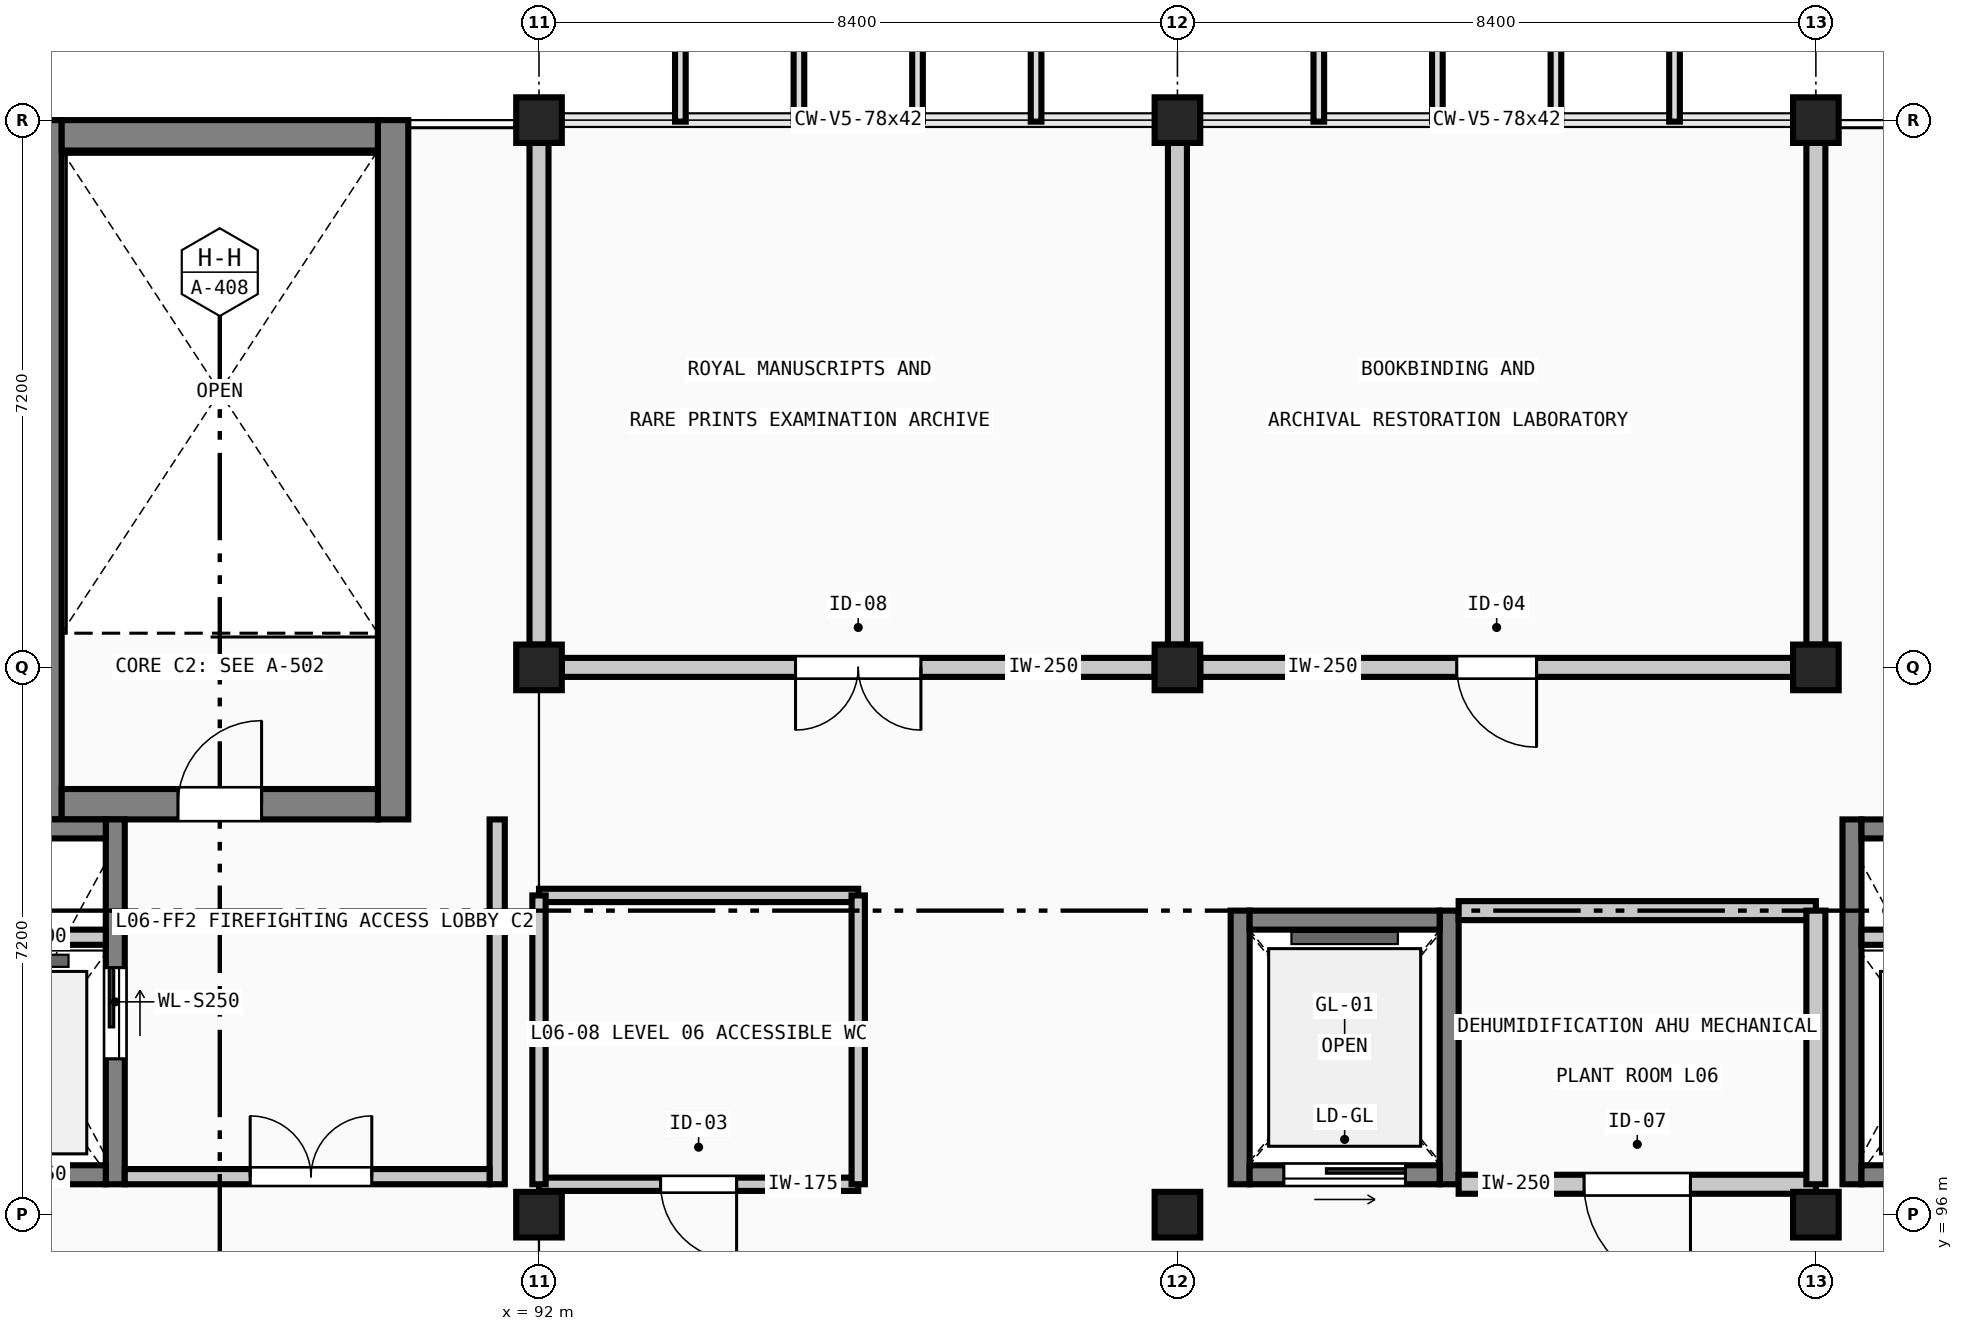
"""IFC4 building model, lengths in metres.
Left out: names, types, materials, properties, quantities, classifications, styles, units other than length and angle.
Written with IfcOpenShell. Run it as: python <this file> out.ifc"""

import sys

from ifc_helpers import new_model, si_unit, direction, frame, frame_2d, origin, origin_2d, place, context, subcontext, project, spatial, rectangle, extrude, element, fill, save


model = new_model("IFC4")
c1 = context("Model", 3, precision=1e-05, world=origin(), true_north=direction((0.0, 1.0)))
c2 = subcontext(c1, "Body", "Model", "MODEL_VIEW")
j1 = project(units=[si_unit("LENGTHUNIT", "METRE"), si_unit("PLANEANGLEUNIT", "RADIAN")], contexts=[c1])
p1 = place(None, origin())
s1 = spatial("IfcSite", under=j1, at=p1, CompositionType="ELEMENT")
p2 = place(p1, origin())
s2 = spatial("IfcBuilding", under=s1, at=p2, CompositionType="ELEMENT")
p3 = place(p2, frame((0.0, 0.0, 27.84)))
s3 = spatial("IfcBuildingStorey", under=s2, at=p3, CompositionType="ELEMENT", Elevation=27.84)
for number, where, z_axis, x_axis in (
    (1, (92.0, 96.0, 0.0), (0.0, 0.0, 1.0), (1.0, 0.0, 0.0)),
    (2, (92.0, 103.2, 0.0), (0.0, 0.0, 1.0), (1.0, 0.0, 0.0)),
    (3, (92.0, 110.4, 0.0), (0.0, 0.0, 1.0), (1.0, 0.0, 0.0)),
    (4, (100.4, 96.0, 0.0), (0.0, 0.0, 1.0), (1.0, 0.0, 0.0)),
    (5, (100.4, 103.2, 0.0), (0.0, 0.0, 1.0), (1.0, 0.0, 0.0)),
    (6, (100.4, 110.4, 0.0), (0.0, 0.0, 1.0), (1.0, 0.0, 0.0)),
    (7, (108.8, 96.0, 0.0), (0.0, 0.0, 1.0), (1.0, 0.0, 0.0)),
    (8, (108.8, 103.2, 0.0), (0.0, 0.0, 1.0), (1.0, 0.0, 0.0)),
    (9, (108.8, 110.4, 0.0), (0.0, 0.0, 1.0), (1.0, 0.0, 0.0)),
):
    element("IfcColumn", number, at=place(p3, frame(where, z_axis=z_axis, x_axis=x_axis)), inside=s3, PredefinedType="COLUMN", context=c2, shape_type="SweptSolid", body=[
        extrude(rectangle(XDim=0.6, YDim=0.6, at=origin_2d()), origin(), (0.0, 0.0, 1.0), 4.48),
    ])
for number, where, z_axis, x_axis in (
    (10, (85.52, 101.2, 0.0), (0.0, 0.0, 1.0), (0.0, 1.0, 0.0)),
    (11, (90.08, 110.4, 0.0), (0.0, 0.0, 1.0), (0.0, -1.0, 0.0)),
):
    element("IfcWall", number, at=place(p3, frame(where, z_axis=z_axis, x_axis=x_axis)), inside=s3, PredefinedType="SHEAR", context=c2, shape_type="SweptSolid", body=[
        extrude(rectangle(XDim=9.2, YDim=0.4, at=frame_2d((4.6, 0.0))), origin(), (0.0, 0.0, 1.0), 4.28),
    ])
p4 = place(p3, frame((89.88, 101.4, 0.0), z_axis=(0.0, 0.0, 1.0), x_axis=(-1.0, 0.0, 0.0)))
e12 = element("IfcWall", 12, at=p4, inside=s3, PredefinedType="SHEAR", context=c2, shape_type="SweptSolid", body=[
    extrude(rectangle(XDim=4.16, YDim=0.4, at=frame_2d((2.08, 0.0))), origin(), (0.0, 0.0, 1.0), 4.28),
])
p5 = place(p4, frame((1.53, 0.0, 0.0)))
e13 = element("IfcOpeningElement", 13, at=p5, cuts=e12, PredefinedType="OPENING", context=c2, shape_type="SweptSolid", body=[
    extrude(rectangle(XDim=1.1, YDim=2.2, at=frame_2d((0.55, 1.1))), frame((0.0, 0.21, 0.0), z_axis=(0.0, -1.0, 0.0), x_axis=(1.0, 0.0, 0.0)), (0.0, 0.0, 1.0), 0.42),
])
p6 = place(p3, frame((85.72, 110.2, 0.0), z_axis=(0.0, 0.0, 1.0), x_axis=(1.0, 0.0, 0.0)))
e14 = element("IfcWall", 14, at=p6, inside=s3, PredefinedType="SHEAR", context=c2, shape_type="SweptSolid", body=[
    extrude(rectangle(XDim=4.16, YDim=0.4, at=frame_2d((2.08, 0.0))), origin(), (0.0, 0.0, 1.0), 4.28),
])
p7 = place(p3, frame((86.425, 101.2, 0.0), z_axis=(0.0, 0.0, 1.0), x_axis=(0.0, -1.0, 0.0)))
e15 = element("IfcWall", 15, at=p7, inside=s3, PredefinedType="SOLIDWALL", context=c2, shape_type="SweptSolid", body=[
    extrude(rectangle(XDim=4.8, YDim=0.25, at=frame_2d((2.4, 0.0))), origin(), (0.0, 0.0, 1.0), 4.28),
])
p8 = place(p7, frame((1.95, 0.0, 0.0)))
e16 = element("IfcOpeningElement", 16, at=p8, cuts=e15, PredefinedType="OPENING", context=c2, shape_type="SweptSolid", body=[
    extrude(rectangle(XDim=1.2, YDim=2.2, at=frame_2d((0.6, 1.1))), frame((0.0, 0.135, 0.0), z_axis=(0.0, -1.0, 0.0), x_axis=(1.0, 0.0, 0.0)), (0.0, 0.0, 1.0), 0.27),
])
for number, where, z_axis, x_axis in (
    (17, (86.3, 96.525, 0.0), (0.0, 0.0, 1.0), (-1.0, 0.0, 0.0)),
    (18, (84.2, 101.075, 0.0), (0.0, 0.0, 1.0), (1.0, 0.0, 0.0)),
):
    element("IfcWall", number, at=place(p3, frame(where, z_axis=z_axis, x_axis=x_axis)), inside=s3, PredefinedType="SOLIDWALL", context=c2, shape_type="SweptSolid", body=[
        extrude(rectangle(XDim=2.1, YDim=0.25, at=frame_2d((1.05, 0.0))), origin(), (0.0, 0.0, 1.0), 4.28),
    ])
p9 = place(p3, frame((84.2, 99.65, 0.0), z_axis=(0.0, 0.0, 1.0), x_axis=(1.0, 0.0, 0.0)))
e19 = element("IfcWall", 19, at=p9, inside=s3, PredefinedType="SOLIDWALL", context=c2, shape_type="SweptSolid", body=[
    extrude(rectangle(XDim=2.1, YDim=0.2, at=frame_2d((1.05, 0.0))), origin(), (0.0, 0.0, 1.0), 4.28),
])
p10 = place(p3, frame((91.45, 101.2, 0.0), z_axis=(0.0, 0.0, 1.0), x_axis=(0.0, -1.0, 0.0)))
e20 = element("IfcWall", 20, at=p10, inside=s3, PredefinedType="SOLIDWALL", context=c2, shape_type="SweptSolid", body=[
    extrude(rectangle(XDim=4.8, YDim=0.2, at=frame_2d((2.4, 0.0))), origin(), (0.0, 0.0, 1.0), 4.28),
])
p11 = place(p3, frame((91.35, 96.5, 0.0), z_axis=(0.0, 0.0, 1.0), x_axis=(-1.0, 0.0, 0.0)))
e21 = element("IfcWall", 21, at=p11, inside=s3, PredefinedType="SOLIDWALL", context=c2, shape_type="SweptSolid", body=[
    extrude(rectangle(XDim=4.8, YDim=0.2, at=frame_2d((2.4, 0.0))), origin(), (0.0, 0.0, 1.0), 4.28),
])
p12 = place(p11, frame((1.55, 0.0, 0.0)))
e22 = element("IfcOpeningElement", 22, at=p12, cuts=e21, PredefinedType="OPENING", context=c2, shape_type="SweptSolid", body=[
    extrude(rectangle(XDim=1.6, YDim=2.2, at=frame_2d((0.8, 1.1))), frame((0.0, 0.11, 0.0), z_axis=(0.0, -1.0, 0.0), x_axis=(1.0, 0.0, 0.0)), (0.0, 0.0, 1.0), 0.22),
])
p13 = place(p3, frame((109.275, 96.4, 0.0), z_axis=(0.0, 0.0, 1.0), x_axis=(0.0, 1.0, 0.0)))
e23 = element("IfcWall", 23, at=p13, inside=s3, PredefinedType="SOLIDWALL", context=c2, shape_type="SweptSolid", body=[
    extrude(rectangle(XDim=4.8, YDim=0.25, at=frame_2d((2.4, 0.0))), origin(), (0.0, 0.0, 1.0), 4.28),
])
for number, where, z_axis, x_axis in (
    (24, (111.5, 96.525, 0.0), (0.0, 0.0, 1.0), (-1.0, 0.0, 0.0)),
    (25, (109.4, 101.075, 0.0), (0.0, 0.0, 1.0), (1.0, 0.0, 0.0)),
):
    element("IfcWall", number, at=place(p3, frame(where, z_axis=z_axis, x_axis=x_axis)), inside=s3, PredefinedType="SOLIDWALL", context=c2, shape_type="SweptSolid", body=[
        extrude(rectangle(XDim=2.1, YDim=0.25, at=frame_2d((1.05, 0.0))), origin(), (0.0, 0.0, 1.0), 4.28),
    ])
p14 = place(p3, frame((109.4, 99.65, 0.0), z_axis=(0.0, 0.0, 1.0), x_axis=(1.0, 0.0, 0.0)))
e26 = element("IfcWall", 26, at=p14, inside=s3, PredefinedType="SOLIDWALL", context=c2, shape_type="SweptSolid", body=[
    extrude(rectangle(XDim=2.1, YDim=0.2, at=frame_2d((1.05, 0.0))), origin(), (0.0, 0.0, 1.0), 4.28),
])
for number, where, z_axis, x_axis in (
    (27, (101.225, 96.4, 0.0), (0.0, 0.0, 1.0), (0.0, 1.0, 0.0)),
    (28, (103.975, 100.0, 0.0), (0.0, 0.0, 1.0), (0.0, -1.0, 0.0)),
):
    element("IfcWall", number, at=place(p3, frame(where, z_axis=z_axis, x_axis=x_axis)), inside=s3, PredefinedType="SOLIDWALL", context=c2, shape_type="SweptSolid", body=[
        extrude(rectangle(XDim=3.6, YDim=0.25, at=frame_2d((1.8, 0.0))), origin(), (0.0, 0.0, 1.0), 4.28),
    ])
p15 = place(p3, frame((103.85, 96.525, 0.0), z_axis=(0.0, 0.0, 1.0), x_axis=(-1.0, 0.0, 0.0)))
e29 = element("IfcWall", 29, at=p15, inside=s3, PredefinedType="SOLIDWALL", context=c2, shape_type="SweptSolid", body=[
    extrude(rectangle(XDim=2.5, YDim=0.25, at=frame_2d((1.25, 0.0))), origin(), (0.0, 0.0, 1.0), 4.28),
])
p16 = place(p15, frame((0.45, 0.0, 0.0)))
e30 = element("IfcOpeningElement", 30, at=p16, cuts=e29, PredefinedType="OPENING", context=c2, shape_type="SweptSolid", body=[
    extrude(rectangle(XDim=1.6, YDim=2.3, at=frame_2d((0.8, 1.15))), frame((0.0, 0.135, 0.0), z_axis=(0.0, -1.0, 0.0), x_axis=(1.0, 0.0, 0.0)), (0.0, 0.0, 1.0), 0.27),
])
p17 = place(p3, frame((101.35, 99.875, 0.0), z_axis=(0.0, 0.0, 1.0), x_axis=(1.0, 0.0, 0.0)))
e31 = element("IfcWall", 31, at=p17, inside=s3, PredefinedType="SOLIDWALL", context=c2, shape_type="SweptSolid", body=[
    extrude(rectangle(XDim=2.5, YDim=0.25, at=frame_2d((1.25, 0.0))), origin(), (0.0, 0.0, 1.0), 4.28),
])
p18 = place(p3, frame((100.1, 103.2, 0.0), z_axis=(0.0, 0.0, 1.0), x_axis=(-1.0, 0.0, 0.0)))
e32 = element("IfcWall", 32, at=p18, inside=s3, PredefinedType="SOLIDWALL", context=c2, shape_type="SweptSolid", body=[
    extrude(rectangle(XDim=7.8, YDim=0.25, at=frame_2d((3.9, 0.0))), origin(), (0.0, 0.0, 1.0), 3.53),
])
p19 = place(p18, frame((3.075, 0.0, 0.0)))
e33 = element("IfcOpeningElement", 33, at=p19, cuts=e32, PredefinedType="OPENING", context=c2, shape_type="SweptSolid", body=[
    extrude(rectangle(XDim=1.65, YDim=2.25, at=frame_2d((0.825, 1.125))), frame((0.0, 0.135, 0.0), z_axis=(0.0, -1.0, 0.0), x_axis=(1.0, 0.0, 0.0)), (0.0, 0.0, 1.0), 0.27),
])
p20 = place(p3, frame((108.5, 103.2, 0.0), z_axis=(0.0, 0.0, 1.0), x_axis=(-1.0, 0.0, 0.0)))
e34 = element("IfcWall", 34, at=p20, inside=s3, PredefinedType="SOLIDWALL", context=c2, shape_type="SweptSolid", body=[
    extrude(rectangle(XDim=7.8, YDim=0.25, at=frame_2d((3.9, 0.0))), origin(), (0.0, 0.0, 1.0), 3.53),
])
p21 = place(p20, frame((3.375, 0.0, 0.0)))
e35 = element("IfcOpeningElement", 35, at=p21, cuts=e34, PredefinedType="OPENING", context=c2, shape_type="SweptSolid", body=[
    extrude(rectangle(XDim=1.05, YDim=2.2, at=frame_2d((0.525, 1.1))), frame((0.0, 0.135, 0.0), z_axis=(0.0, -1.0, 0.0), x_axis=(1.0, 0.0, 0.0)), (0.0, 0.0, 1.0), 0.27),
])
p22 = place(p3, frame((108.8, 96.4, 0.0), z_axis=(0.0, 0.0, 1.0), x_axis=(-1.0, 0.0, 0.0)))
e36 = element("IfcWall", 36, at=p22, inside=s3, PredefinedType="SOLIDWALL", context=c2, shape_type="SweptSolid", body=[
    extrude(rectangle(XDim=4.7, YDim=0.25, at=frame_2d((2.35, 0.0))), origin(), (0.0, 0.0, 1.0), 4.28),
])
p23 = place(p22, frame((1.65, 0.0, 0.0)))
e37 = element("IfcOpeningElement", 37, at=p23, cuts=e36, PredefinedType="OPENING", context=c2, shape_type="SweptSolid", body=[
    extrude(rectangle(XDim=1.4, YDim=2.2, at=frame_2d((0.7, 1.1))), frame((0.0, 0.135, 0.0), z_axis=(0.0, -1.0, 0.0), x_axis=(1.0, 0.0, 0.0)), (0.0, 0.0, 1.0), 0.27),
])
p24 = place(p3, frame((96.2, 96.4, 0.0), z_axis=(0.0, 0.0, 1.0), x_axis=(-1.0, 0.0, 0.0)))
e38 = element("IfcWall", 38, at=p24, inside=s3, PredefinedType="PLUMBINGWALL", context=c2, shape_type="SweptSolid", body=[
    extrude(rectangle(XDim=4.2, YDim=0.175, at=frame_2d((2.1, 0.0))), origin(), (0.0, 0.0, 1.0), 4.28),
])
p25 = place(p24, frame((1.6, 0.0, 0.0)))
e39 = element("IfcOpeningElement", 39, at=p25, cuts=e38, PredefinedType="OPENING", context=c2, shape_type="SweptSolid", body=[
    extrude(rectangle(XDim=1.0, YDim=2.15, at=frame_2d((0.5, 1.075))), frame((0.0, 0.097, 0.0), z_axis=(0.0, -1.0, 0.0), x_axis=(1.0, 0.0, 0.0)), (0.0, 0.0, 1.0), 0.195),
])
for number, where, z_axis, x_axis in (
    (40, (92.0, 103.5, 0.0), (0.0, 0.0, 1.0), (0.0, 1.0, 0.0)),
    (41, (100.4, 110.1, 0.0), (0.0, 0.0, 1.0), (0.0, -1.0, 0.0)),
    (42, (108.8, 110.1, 0.0), (0.0, 0.0, 1.0), (0.0, -1.0, 0.0)),
):
    element("IfcWall", number, at=place(p3, frame(where, z_axis=z_axis, x_axis=x_axis)), inside=s3, PredefinedType="SOLIDWALL", context=c2, shape_type="SweptSolid", body=[
        extrude(rectangle(XDim=6.6, YDim=0.25, at=frame_2d((3.3, 0.0))), origin(), (0.0, 0.0, 1.0), 3.53),
    ])
p26 = place(p3, frame((104.1, 100.0, 0.0), z_axis=(0.0, 0.0, 1.0), x_axis=(1.0, 0.0, 0.0)))
e43 = element("IfcWall", 43, at=p26, inside=s3, PredefinedType="SOLIDWALL", context=c2, shape_type="SweptSolid", body=[
    extrude(rectangle(XDim=4.7, YDim=0.25, at=frame_2d((2.35, 0.0))), origin(), (0.0, 0.0, 1.0), 4.28),
])
p27 = place(p3, frame((108.8, 100.0, 0.0), z_axis=(0.0, 0.0, 1.0), x_axis=(0.0, -1.0, 0.0)))
e44 = element("IfcWall", 44, at=p27, inside=s3, PredefinedType="SOLIDWALL", context=c2, shape_type="SweptSolid", body=[
    extrude(rectangle(XDim=3.6, YDim=0.25, at=frame_2d((1.8, 0.0))), origin(), (0.0, 0.0, 1.0), 3.53),
])
p28 = place(p3, frame((92.0, 100.2, 0.0), z_axis=(0.0, 0.0, 1.0), x_axis=(1.0, 0.0, 0.0)))
e45 = element("IfcWall", 45, at=p28, inside=s3, PredefinedType="PLUMBINGWALL", context=c2, shape_type="SweptSolid", body=[
    extrude(rectangle(XDim=4.2, YDim=0.175, at=frame_2d((2.1, 0.0))), origin(), (0.0, 0.0, 1.0), 4.28),
])
p29 = place(p3, frame((92.0, 96.4, 0.0), z_axis=(0.0, 0.0, 1.0), x_axis=(0.0, 1.0, 0.0)))
e46 = element("IfcWall", 46, at=p29, inside=s3, PredefinedType="PLUMBINGWALL", context=c2, shape_type="SweptSolid", body=[
    extrude(rectangle(XDim=3.8, YDim=0.175, at=frame_2d((1.9, 0.0))), origin(), (0.0, 0.0, 1.0), 3.53),
])
p30 = place(p3, frame((96.2, 100.2, 0.0), z_axis=(0.0, 0.0, 1.0), x_axis=(0.0, -1.0, 0.0)))
e47 = element("IfcWall", 47, at=p30, inside=s3, PredefinedType="PLUMBINGWALL", context=c2, shape_type="SweptSolid", body=[
    extrude(rectangle(XDim=3.8, YDim=0.175, at=frame_2d((1.9, 0.0))), origin(), (0.0, 0.0, 1.0), 4.28),
])
p31 = place(p5, frame((1.1, 0.0, 0.0), z_axis=(0.0, 0.0, 1.0), x_axis=(-1.0, 0.0, 0.0)))
e48 = element("IfcDoor", 48, at=p31, inside=s3, OperationType="SINGLE_SWING_RIGHT", PredefinedType="DOOR", context=c2, shape_type="SweptSolid", body=[
    extrude(rectangle(XDim=1.1, YDim=2.2, at=frame_2d((0.55, 1.1))), frame((0.0, 0.025, 0.0), z_axis=(0.0, -1.0, 0.0), x_axis=(1.0, 0.0, 0.0)), (0.0, 0.0, 1.0), 0.05),
])
fill(e13, e48)
p32 = place(p8, origin())
e49 = element("IfcDoor", 49, at=p32, inside=s3, OperationType="SLIDING_TO_LEFT", PredefinedType="DOOR", context=c2, shape_type="SweptSolid", body=[
    extrude(rectangle(XDim=1.2, YDim=2.2, at=frame_2d((0.6, 1.1))), frame((0.0, 0.025, 0.0), z_axis=(0.0, -1.0, 0.0), x_axis=(1.0, 0.0, 0.0)), (0.0, 0.0, 1.0), 0.05),
])
fill(e16, e49)
p33 = place(p12, frame((1.6, 0.0, 0.0), z_axis=(0.0, 0.0, 1.0), x_axis=(-1.0, 0.0, 0.0)))
e50 = element("IfcDoor", 50, at=p33, inside=s3, OperationType="DOUBLE_DOOR_SINGLE_SWING", PredefinedType="DOOR", context=c2, shape_type="SweptSolid", body=[
    extrude(rectangle(XDim=1.6, YDim=2.2, at=frame_2d((0.8, 1.1))), frame((0.0, 0.025, 0.0), z_axis=(0.0, -1.0, 0.0), x_axis=(1.0, 0.0, 0.0)), (0.0, 0.0, 1.0), 0.05),
])
fill(e22, e50)
p34 = place(p16, origin())
e51 = element("IfcDoor", 51, at=p34, inside=s3, OperationType="SLIDING_TO_LEFT", PredefinedType="DOOR", context=c2, shape_type="SweptSolid", body=[
    extrude(rectangle(XDim=1.6, YDim=2.3, at=frame_2d((0.8, 1.15))), frame((0.0, 0.025, 0.0), z_axis=(0.0, -1.0, 0.0), x_axis=(1.0, 0.0, 0.0)), (0.0, 0.0, 1.0), 0.05),
])
fill(e30, e51)
p35 = place(p2, frame((0.0, 0.0, 32.32)))
p36 = place(p35, frame((0.0, 0.0, -0.2)))
p37 = place(p36, frame((102.1, 101.0, 0.0)))
p38 = place(p37, frame((0.0, 0.0, 0.15)))
e52 = element("IfcWindow", 52, at=p38, inside=s3, PartitioningType="SINGLE_PANEL", PredefinedType="SKYLIGHT", context=c2, shape_type="SweptSolid", body=[
    extrude(rectangle(XDim=1.8, YDim=1.8, at=origin_2d()), origin(), (0.0, 0.0, 1.0), 0.05),
])
p39 = place(p36, frame((107.1, 101.0, 0.0)))
p40 = place(p39, frame((0.0, 0.0, 0.15)))
e53 = element("IfcWindow", 53, at=p40, inside=s3, PartitioningType="SINGLE_PANEL", PredefinedType="LIGHTDOME", context=c2, shape_type="SweptSolid", body=[
    extrude(rectangle(XDim=1.4, YDim=1.4, at=origin_2d()), origin(), (0.0, 0.0, 1.0), 0.05),
])
p41 = place(p19, origin())
e54 = element("IfcDoor", 54, at=p41, inside=s3, OperationType="DOUBLE_DOOR_SINGLE_SWING", PredefinedType="DOOR", context=c2, shape_type="SweptSolid", body=[
    extrude(rectangle(XDim=1.65, YDim=2.25, at=frame_2d((0.825, 1.125))), frame((0.0, 0.025, 0.0), z_axis=(0.0, -1.0, 0.0), x_axis=(1.0, 0.0, 0.0)), (0.0, 0.0, 1.0), 0.05),
])
fill(e33, e54)
p42 = place(p21, origin())
e55 = element("IfcDoor", 55, at=p42, inside=s3, OperationType="SINGLE_SWING_LEFT", PredefinedType="DOOR", context=c2, shape_type="SweptSolid", body=[
    extrude(rectangle(XDim=1.05, YDim=2.2, at=frame_2d((0.525, 1.1))), frame((0.0, 0.025, 0.0), z_axis=(0.0, -1.0, 0.0), x_axis=(1.0, 0.0, 0.0)), (0.0, 0.0, 1.0), 0.05),
])
fill(e35, e55)
p43 = place(p23, origin())
e56 = element("IfcDoor", 56, at=p43, inside=s3, OperationType="SINGLE_SWING_LEFT", PredefinedType="DOOR", context=c2, shape_type="SweptSolid", body=[
    extrude(rectangle(XDim=1.4, YDim=2.2, at=frame_2d((0.7, 1.1))), frame((0.0, 0.025, 0.0), z_axis=(0.0, -1.0, 0.0), x_axis=(1.0, 0.0, 0.0)), (0.0, 0.0, 1.0), 0.05),
])
fill(e37, e56)
p44 = place(p25, origin())
e57 = element("IfcDoor", 57, at=p44, inside=s3, OperationType="SINGLE_SWING_LEFT", PredefinedType="DOOR", context=c2, shape_type="SweptSolid", body=[
    extrude(rectangle(XDim=1.0, YDim=2.15, at=frame_2d((0.5, 1.075))), frame((0.0, 0.025, 0.0), z_axis=(0.0, -1.0, 0.0), x_axis=(1.0, 0.0, 0.0)), (0.0, 0.0, 1.0), 0.05),
])
fill(e39, e57)
save(model, sys.argv[1])
